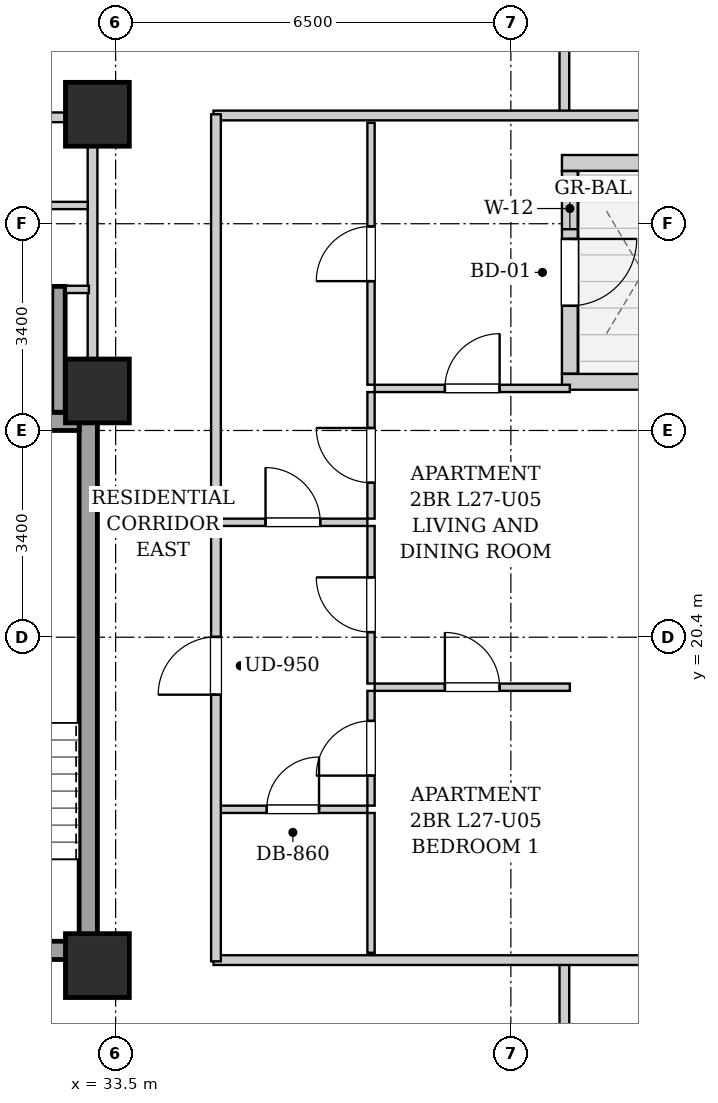
"""IFC4 building model, lengths in metres.
Left out: names, types, materials, properties, quantities, classifications, styles, units other than length and angle.
Written with IfcOpenShell. Run it as: python <this file> out.ifc"""

import sys

from ifc_helpers import new_model, si_unit, direction, frame, frame_2d, origin, origin_2d, place, context, subcontext, project, spatial, rectangle, extrude, element, fill, save


model = new_model("IFC4")
c1 = context("Model", 3, precision=1e-05, world=origin(), true_north=direction((0.0, 1.0)))
c2 = subcontext(c1, "Body", "Model", "MODEL_VIEW")
j1 = project(units=[si_unit("LENGTHUNIT", "METRE"), si_unit("PLANEANGLEUNIT", "RADIAN")], contexts=[c1])
p1 = place(None, origin())
s1 = spatial("IfcSite", under=j1, at=p1, CompositionType="ELEMENT")
p2 = place(p1, origin())
s2 = spatial("IfcBuilding", under=s1, at=p2, CompositionType="ELEMENT")
p3 = place(p2, frame((0.0, 0.0, 97.5)))
s3 = spatial("IfcBuildingStorey", under=s2, at=p3, CompositionType="ELEMENT", Elevation=97.5)
for number, where, z_axis, x_axis in (
    (1, (33.2, 15.0, 0.0), (0.0, 0.0, 1.0), (1.0, 0.0, 0.0)),
    (2, (33.2, 29.0, 0.0), (0.0, 0.0, 1.0), (1.0, 0.0, 0.0)),
    (3, (33.2, 24.45, 0.0), (0.0, 0.0, 1.0), (1.0, 0.0, 0.0)),
):
    element("IfcColumn", number, at=place(p3, frame(where, z_axis=z_axis, x_axis=x_axis)), inside=s3, PredefinedType="COLUMN", context=c2, shape_type="SweptSolid", body=[
        extrude(rectangle(XDim=1.05, YDim=1.05, at=origin_2d()), origin(), (0.0, 0.0, 1.0), 3.2),
    ])
p4 = place(p3, frame((43.24, 28.2, 0.0), z_axis=(0.0, 0.0, 1.0), x_axis=(-1.0, 0.0, 0.0)))
e4 = element("IfcWall", 4, at=p4, inside=s3, PredefinedType="SOLIDWALL", context=c2, shape_type="SweptSolid", body=[
    extrude(rectangle(XDim=2.4, YDim=0.26, at=frame_2d((1.2, 0.0))), origin(), (0.0, 0.0, 1.0), 2.94),
])
p5 = place(p3, frame((40.97, 28.066, 0.0), z_axis=(0.0, 0.0, 1.0), x_axis=(0.0, -1.0, 0.0)))
e5 = element("IfcWall", 5, at=p5, inside=s3, PredefinedType="SOLIDWALL", context=c2, shape_type="SweptSolid", body=[
    extrude(rectangle(XDim=3.332, YDim=0.26, at=frame_2d((1.666, 0.0))), origin(), (0.0, 0.0, 1.0), 2.94),
])
p6 = place(p5, frame((1.116, 0.0, 0.0)))
e6 = element("IfcOpeningElement", 6, at=p6, cuts=e5, PredefinedType="OPENING", context=c2, shape_type="SweptSolid", body=[
    extrude(rectangle(XDim=1.1, YDim=2.0, at=frame_2d((0.55, 1.0))), frame((0.0, 0.14, 0.0), z_axis=(0.0, -1.0, 0.0), x_axis=(1.0, 0.0, 0.0)), (0.0, 0.0, 1.0), 0.28),
])
p7 = place(p5, frame((0.276, 0.0, 0.55)))
e7 = element("IfcOpeningElement", 7, at=p7, cuts=e5, PredefinedType="OPENING", context=c2, shape_type="SweptSolid", body=[
    extrude(rectangle(XDim=0.68, YDim=1.2, at=frame_2d((0.34, 0.6))), frame((0.0, 0.14, 0.0), z_axis=(0.0, -1.0, 0.0), x_axis=(1.0, 0.0, 0.0)), (0.0, 0.0, 1.0), 0.28),
])
p8 = place(p3, frame((40.84, 24.6, 0.0), z_axis=(0.0, 0.0, 1.0), x_axis=(1.0, 0.0, 0.0)))
e8 = element("IfcWall", 8, at=p8, inside=s3, PredefinedType="SOLIDWALL", context=c2, shape_type="SweptSolid", body=[
    extrude(rectangle(XDim=2.4, YDim=0.26, at=frame_2d((1.2, 0.0))), origin(), (0.0, 0.0, 1.0), 2.94),
])
p9 = place(p3, frame((33.05, 15.1, 0.0), z_axis=(0.0, 0.0, 1.0), x_axis=(0.0, 1.0, 0.0)))
e9 = element("IfcWall", 9, at=p9, inside=s3, PredefinedType="SHEAR", context=c2, shape_type="SweptSolid", body=[
    extrude(rectangle(XDim=9.0, YDim=0.3, at=frame_2d((4.5, 0.0))), origin(), (0.0, 0.0, 1.0), 2.94),
])
p10 = place(p3, frame((30.05, 23.95, 0.0), z_axis=(0.0, 0.0, 1.0), x_axis=(1.0, 0.0, 0.0)))
e10 = element("IfcWall", 10, at=p10, inside=s3, PredefinedType="SHEAR", context=c2, shape_type="SweptSolid", body=[
    extrude(rectangle(XDim=2.85, YDim=0.3, at=frame_2d((1.425, 0.0))), origin(), (0.0, 0.0, 1.0), 2.94),
])
p11 = place(p3, frame((30.05, 15.25, 0.0), z_axis=(0.0, 0.0, 1.0), x_axis=(1.0, 0.0, 0.0)))
e11 = element("IfcWall", 11, at=p11, inside=s3, PredefinedType="SHEAR", context=c2, shape_type="SweptSolid", body=[
    extrude(rectangle(XDim=2.85, YDim=0.3, at=frame_2d((1.425, 0.0))), origin(), (0.0, 0.0, 1.0), 2.94),
])
p12 = place(p11, frame((0.86, 0.0, 0.0)))
e12 = element("IfcOpeningElement", 12, at=p12, cuts=e11, PredefinedType="OPENING", context=c2, shape_type="SweptSolid", body=[
    extrude(rectangle(XDim=1.1, YDim=2.05, at=frame_2d((0.55, 1.025))), frame((0.0, 0.16, 0.0), z_axis=(0.0, -1.0, 0.0), x_axis=(1.0, 0.0, 0.0)), (0.0, 0.0, 1.0), 0.32),
])
p13 = place(p3, frame((32.56, 24.1, 0.0), z_axis=(0.0, 0.0, 1.0), x_axis=(0.0, 1.0, 0.0)))
e13 = element("IfcWall", 13, at=p13, inside=s3, PredefinedType="SHEAR", context=c2, shape_type="SweptSolid", body=[
    extrude(rectangle(XDim=2.07, YDim=0.22, at=frame_2d((1.035, 0.0))), origin(), (0.0, 0.0, 1.0), 2.94),
])
p14 = place(p3, frame((33.12, 24.12, 0.0), z_axis=(0.0, 0.0, 1.0), x_axis=(0.0, 1.0, 0.0)))
e14 = element("IfcWall", 14, at=p14, inside=s3, PredefinedType="PARTITIONING", context=c2, shape_type="SweptSolid", body=[
    extrude(rectangle(XDim=4.76, YDim=0.16, at=frame_2d((2.38, 0.0))), origin(), (0.0, 0.0, 1.0), 2.275),
])
p15 = place(p3, frame((32.68, 26.12, 0.0), z_axis=(0.0, 0.0, 1.0), x_axis=(1.0, 0.0, 0.0)))
e15 = element("IfcWall", 15, at=p15, inside=s3, PredefinedType="PARTITIONING", context=c2, shape_type="SweptSolid", body=[
    extrude(rectangle(XDim=0.38, YDim=0.12, at=frame_2d((0.19, 0.0))), origin(), (0.0, 0.0, 1.0), 2.94),
])
p16 = place(p3, frame((30.16, 27.5, 0.0), z_axis=(0.0, 0.0, 1.0), x_axis=(1.0, 0.0, 0.0)))
e16 = element("IfcWall", 16, at=p16, inside=s3, PredefinedType="PARTITIONING", context=c2, shape_type="SweptSolid", body=[
    extrude(rectangle(XDim=2.88, YDim=0.12, at=frame_2d((1.44, 0.0))), origin(), (0.0, 0.0, 1.0), 2.94),
])
p17 = place(p16, frame((0.97, 0.0, 0.0)))
e17 = element("IfcOpeningElement", 17, at=p17, cuts=e16, PredefinedType="OPENING", context=c2, shape_type="SweptSolid", body=[
    extrude(rectangle(XDim=0.86, YDim=2.05, at=frame_2d((0.43, 1.025))), frame((0.0, 0.07, 0.0), z_axis=(0.0, -1.0, 0.0), x_axis=(1.0, 0.0, 0.0)), (0.0, 0.0, 1.0), 0.14),
])
p18 = place(p3, frame((30.08, 28.95, 0.0), z_axis=(0.0, 0.0, 1.0), x_axis=(1.0, 0.0, 0.0)))
e18 = element("IfcWall", 18, at=p18, inside=s3, PredefinedType="PARTITIONING", context=c2, shape_type="SweptSolid", body=[
    extrude(rectangle(XDim=2.96, YDim=0.16, at=frame_2d((1.48, 0.0))), origin(), (0.0, 0.0, 1.0), 2.94),
])
p19 = place(p18, frame((1.045, 0.0, 0.0)))
e19 = element("IfcOpeningElement", 19, at=p19, cuts=e18, PredefinedType="OPENING", context=c2, shape_type="SweptSolid", body=[
    extrude(rectangle(XDim=0.86, YDim=2.05, at=frame_2d((0.43, 1.025))), frame((0.0, 0.09, 0.0), z_axis=(0.0, -1.0, 0.0), x_axis=(1.0, 0.0, 0.0)), (0.0, 0.0, 1.0), 0.18),
])
for number, where, z_axis, x_axis in (
    (20, (40.88, 13.35, 0.0), (0.0, 0.0, 1.0), (0.0, 1.0, 0.0)),
    (21, (40.88, 28.98, 0.0), (0.0, 0.0, 1.0), (0.0, 1.0, 0.0)),
):
    element("IfcWall", number, at=place(p3, frame(where, z_axis=z_axis, x_axis=x_axis)), inside=s3, PredefinedType="PARTITIONING", context=c2, shape_type="SweptSolid", body=[
        extrude(rectangle(XDim=1.74, YDim=0.16, at=frame_2d((0.87, 0.0))), origin(), (0.0, 0.0, 1.0), 2.94),
    ])
for number, where, z_axis, x_axis in (
    (22, (35.11, 15.09, 0.0), (0.0, 0.0, 1.0), (1.0, 0.0, 0.0)),
    (23, (35.11, 28.98, 0.0), (0.0, 0.0, 1.0), (1.0, 0.0, 0.0)),
):
    element("IfcWall", number, at=place(p3, frame(where, z_axis=z_axis, x_axis=x_axis)), inside=s3, PredefinedType="PARTITIONING", context=c2, shape_type="SweptSolid", body=[
        extrude(rectangle(XDim=8.01, YDim=0.16, at=frame_2d((4.005, 0.0))), origin(), (0.0, 0.0, 1.0), 2.313),
    ])
p20 = place(p3, frame((35.19, 22.29, 0.0), z_axis=(0.0, 0.0, 1.0), x_axis=(1.0, 0.0, 0.0)))
e24 = element("IfcWall", 24, at=p20, inside=s3, PredefinedType="PARTITIONING", context=c2, shape_type="SweptSolid", body=[
    extrude(rectangle(XDim=2.45, YDim=0.12, at=frame_2d((1.225, 0.0))), origin(), (0.0, 0.0, 1.0), 2.94),
])
p21 = place(p20, frame((0.775, 0.0, 0.0)))
e25 = element("IfcOpeningElement", 25, at=p21, cuts=e24, PredefinedType="OPENING", context=c2, shape_type="SweptSolid", body=[
    extrude(rectangle(XDim=0.9, YDim=2.05, at=frame_2d((0.45, 1.025))), frame((0.0, 0.07, 0.0), z_axis=(0.0, -1.0, 0.0), x_axis=(1.0, 0.0, 0.0)), (0.0, 0.0, 1.0), 0.14),
])
p22 = place(p3, frame((37.7, 22.35, 0.0), z_axis=(0.0, 0.0, 1.0), x_axis=(0.0, 1.0, 0.0)))
e26 = element("IfcWall", 26, at=p22, inside=s3, PredefinedType="PARTITIONING", context=c2, shape_type="SweptSolid", body=[
    extrude(rectangle(XDim=2.082, YDim=0.12, at=frame_2d((1.041, 0.0))), origin(), (0.0, 0.0, 1.0), 2.94),
])
p23 = place(p22, frame((0.591, 0.0, 0.0)))
e27 = element("IfcOpeningElement", 27, at=p23, cuts=e26, PredefinedType="OPENING", context=c2, shape_type="SweptSolid", body=[
    extrude(rectangle(XDim=0.9, YDim=2.05, at=frame_2d((0.45, 1.025))), frame((0.0, 0.07, 0.0), z_axis=(0.0, -1.0, 0.0), x_axis=(1.0, 0.0, 0.0)), (0.0, 0.0, 1.0), 0.14),
])
p24 = place(p3, frame((37.7, 24.552, 0.0), z_axis=(0.0, 0.0, 1.0), x_axis=(0.0, 1.0, 0.0)))
e28 = element("IfcWall", 28, at=p24, inside=s3, PredefinedType="PARTITIONING", context=c2, shape_type="SweptSolid", body=[
    extrude(rectangle(XDim=4.308, YDim=0.12, at=frame_2d((2.154, 0.0))), origin(), (0.0, 0.0, 1.0), 2.94),
])
p25 = place(p24, frame((1.704, 0.0, 0.0)))
e29 = element("IfcOpeningElement", 29, at=p25, cuts=e28, PredefinedType="OPENING", context=c2, shape_type="SweptSolid", body=[
    extrude(rectangle(XDim=0.9, YDim=2.05, at=frame_2d((0.45, 1.025))), frame((0.0, 0.07, 0.0), z_axis=(0.0, -1.0, 0.0), x_axis=(1.0, 0.0, 0.0)), (0.0, 0.0, 1.0), 0.14),
])
p26 = place(p3, frame((35.19, 17.57, 0.0), z_axis=(0.0, 0.0, 1.0), x_axis=(1.0, 0.0, 0.0)))
e30 = element("IfcWall", 30, at=p26, inside=s3, PredefinedType="PARTITIONING", context=c2, shape_type="SweptSolid", body=[
    extrude(rectangle(XDim=2.45, YDim=0.12, at=frame_2d((1.225, 0.0))), origin(), (0.0, 0.0, 1.0), 2.94),
])
p27 = place(p26, frame((0.795, 0.0, 0.0)))
e31 = element("IfcOpeningElement", 31, at=p27, cuts=e30, PredefinedType="OPENING", context=c2, shape_type="SweptSolid", body=[
    extrude(rectangle(XDim=0.86, YDim=2.05, at=frame_2d((0.43, 1.025))), frame((0.0, 0.07, 0.0), z_axis=(0.0, -1.0, 0.0), x_axis=(1.0, 0.0, 0.0)), (0.0, 0.0, 1.0), 0.14),
])
p28 = place(p3, frame((37.7, 15.21, 0.0), z_axis=(0.0, 0.0, 1.0), x_axis=(0.0, 1.0, 0.0)))
e32 = element("IfcWall", 32, at=p28, inside=s3, PredefinedType="PARTITIONING", context=c2, shape_type="SweptSolid", body=[
    extrude(rectangle(XDim=2.3, YDim=0.12, at=frame_2d((1.15, 0.0))), origin(), (0.0, 0.0, 1.0), 2.94),
])
p29 = place(p3, frame((37.7, 17.63, 0.0), z_axis=(0.0, 0.0, 1.0), x_axis=(0.0, 1.0, 0.0)))
e33 = element("IfcWall", 33, at=p29, inside=s3, PredefinedType="PARTITIONING", context=c2, shape_type="SweptSolid", body=[
    extrude(rectangle(XDim=1.888, YDim=0.12, at=frame_2d((0.944, 0.0))), origin(), (0.0, 0.0, 1.0), 2.94),
])
p30 = place(p29, frame((0.494, 0.0, 0.0)))
e34 = element("IfcOpeningElement", 34, at=p30, cuts=e33, PredefinedType="OPENING", context=c2, shape_type="SweptSolid", body=[
    extrude(rectangle(XDim=0.9, YDim=2.05, at=frame_2d((0.45, 1.025))), frame((0.0, 0.07, 0.0), z_axis=(0.0, -1.0, 0.0), x_axis=(1.0, 0.0, 0.0)), (0.0, 0.0, 1.0), 0.14),
])
p31 = place(p3, frame((37.7, 19.638, 0.0), z_axis=(0.0, 0.0, 1.0), x_axis=(0.0, 1.0, 0.0)))
e35 = element("IfcWall", 35, at=p31, inside=s3, PredefinedType="PARTITIONING", context=c2, shape_type="SweptSolid", body=[
    extrude(rectangle(XDim=2.592, YDim=0.12, at=frame_2d((1.296, 0.0))), origin(), (0.0, 0.0, 1.0), 2.94),
])
p32 = place(p31, frame((0.846, 0.0, 0.0)))
e36 = element("IfcOpeningElement", 36, at=p32, cuts=e35, PredefinedType="OPENING", context=c2, shape_type="SweptSolid", body=[
    extrude(rectangle(XDim=0.9, YDim=2.05, at=frame_2d((0.45, 1.025))), frame((0.0, 0.07, 0.0), z_axis=(0.0, -1.0, 0.0), x_axis=(1.0, 0.0, 0.0)), (0.0, 0.0, 1.0), 0.14),
])
p33 = place(p3, frame((37.76, 19.578, 0.0), z_axis=(0.0, 0.0, 1.0), x_axis=(1.0, 0.0, 0.0)))
e37 = element("IfcWall", 37, at=p33, inside=s3, PredefinedType="PARTITIONING", context=c2, shape_type="SweptSolid", body=[
    extrude(rectangle(XDim=3.21, YDim=0.12, at=frame_2d((1.605, 0.0))), origin(), (0.0, 0.0, 1.0), 2.94),
])
p34 = place(p33, frame((1.155, 0.0, 0.0)))
e38 = element("IfcOpeningElement", 38, at=p34, cuts=e37, PredefinedType="OPENING", context=c2, shape_type="SweptSolid", body=[
    extrude(rectangle(XDim=0.9, YDim=2.05, at=frame_2d((0.45, 1.025))), frame((0.0, 0.07, 0.0), z_axis=(0.0, -1.0, 0.0), x_axis=(1.0, 0.0, 0.0)), (0.0, 0.0, 1.0), 0.14),
])
p35 = place(p3, frame((37.76, 24.492, 0.0), z_axis=(0.0, 0.0, 1.0), x_axis=(1.0, 0.0, 0.0)))
e39 = element("IfcWall", 39, at=p35, inside=s3, PredefinedType="PARTITIONING", context=c2, shape_type="SweptSolid", body=[
    extrude(rectangle(XDim=3.21, YDim=0.12, at=frame_2d((1.605, 0.0))), origin(), (0.0, 0.0, 1.0), 2.518),
])
p36 = place(p35, frame((1.155, 0.0, 0.0)))
e40 = element("IfcOpeningElement", 40, at=p36, cuts=e39, PredefinedType="OPENING", context=c2, shape_type="SweptSolid", body=[
    extrude(rectangle(XDim=0.9, YDim=2.05, at=frame_2d((0.45, 1.025))), frame((0.0, 0.07, 0.0), z_axis=(0.0, -1.0, 0.0), x_axis=(1.0, 0.0, 0.0)), (0.0, 0.0, 1.0), 0.14),
])
p37 = place(p3, frame((35.15, 15.07, 0.0), z_axis=(0.0, 0.0, 1.0), x_axis=(0.0, 1.0, 0.0)))
e41 = element("IfcWall", 41, at=p37, inside=s3, PredefinedType="PARTITIONING", context=c2, shape_type="SweptSolid", body=[
    extrude(rectangle(XDim=13.93, YDim=0.16, at=frame_2d((6.965, 0.0))), origin(), (0.0, 0.0, 1.0), 2.94),
])
p38 = place(p37, frame((4.385, 0.0, 0.0)))
e42 = element("IfcOpeningElement", 42, at=p38, cuts=e41, PredefinedType="OPENING", context=c2, shape_type="SweptSolid", body=[
    extrude(rectangle(XDim=0.95, YDim=2.1, at=frame_2d((0.475, 1.05))), frame((0.0, 0.09, 0.0), z_axis=(0.0, -1.0, 0.0), x_axis=(1.0, 0.0, 0.0)), (0.0, 0.0, 1.0), 0.18),
])
p39 = place(p21, origin())
e43 = element("IfcDoor", 43, at=p39, inside=s3, OperationType="SINGLE_SWING_LEFT", PredefinedType="DOOR", context=c2, shape_type="SweptSolid", body=[
    extrude(rectangle(XDim=0.9, YDim=2.05, at=frame_2d((0.45, 1.025))), frame((0.0, 0.025, 0.0), z_axis=(0.0, -1.0, 0.0), x_axis=(1.0, 0.0, 0.0)), (0.0, 0.0, 1.0), 0.05),
])
fill(e25, e43)
p40 = place(p23, origin())
e44 = element("IfcDoor", 44, at=p40, inside=s3, OperationType="SINGLE_SWING_RIGHT", PredefinedType="DOOR", context=c2, shape_type="SweptSolid", body=[
    extrude(rectangle(XDim=0.9, YDim=2.05, at=frame_2d((0.45, 1.025))), frame((0.0, 0.025, 0.0), z_axis=(0.0, -1.0, 0.0), x_axis=(1.0, 0.0, 0.0)), (0.0, 0.0, 1.0), 0.05),
])
fill(e27, e44)
p41 = place(p25, origin())
e45 = element("IfcDoor", 45, at=p41, inside=s3, OperationType="SINGLE_SWING_LEFT", PredefinedType="DOOR", context=c2, shape_type="SweptSolid", body=[
    extrude(rectangle(XDim=0.9, YDim=2.05, at=frame_2d((0.45, 1.025))), frame((0.0, 0.025, 0.0), z_axis=(0.0, -1.0, 0.0), x_axis=(1.0, 0.0, 0.0)), (0.0, 0.0, 1.0), 0.05),
])
fill(e29, e45)
p42 = place(p27, origin())
e46 = element("IfcDoor", 46, at=p42, inside=s3, OperationType="SINGLE_SWING_RIGHT", PredefinedType="DOOR", context=c2, shape_type="SweptSolid", body=[
    extrude(rectangle(XDim=0.86, YDim=2.05, at=frame_2d((0.43, 1.025))), frame((0.0, 0.025, 0.0), z_axis=(0.0, -1.0, 0.0), x_axis=(1.0, 0.0, 0.0)), (0.0, 0.0, 1.0), 0.05),
])
fill(e31, e46)
p43 = place(p30, origin())
e47 = element("IfcDoor", 47, at=p43, inside=s3, OperationType="SINGLE_SWING_LEFT", PredefinedType="DOOR", context=c2, shape_type="SweptSolid", body=[
    extrude(rectangle(XDim=0.9, YDim=2.05, at=frame_2d((0.45, 1.025))), frame((0.0, 0.025, 0.0), z_axis=(0.0, -1.0, 0.0), x_axis=(1.0, 0.0, 0.0)), (0.0, 0.0, 1.0), 0.05),
])
fill(e34, e47)
p44 = place(p32, origin())
e48 = element("IfcDoor", 48, at=p44, inside=s3, OperationType="SINGLE_SWING_RIGHT", PredefinedType="DOOR", context=c2, shape_type="SweptSolid", body=[
    extrude(rectangle(XDim=0.9, YDim=2.05, at=frame_2d((0.45, 1.025))), frame((0.0, 0.025, 0.0), z_axis=(0.0, -1.0, 0.0), x_axis=(1.0, 0.0, 0.0)), (0.0, 0.0, 1.0), 0.05),
])
fill(e36, e48)
p45 = place(p34, origin())
e49 = element("IfcDoor", 49, at=p45, inside=s3, OperationType="SINGLE_SWING_LEFT", PredefinedType="DOOR", context=c2, shape_type="SweptSolid", body=[
    extrude(rectangle(XDim=0.9, YDim=2.05, at=frame_2d((0.45, 1.025))), frame((0.0, 0.025, 0.0), z_axis=(0.0, -1.0, 0.0), x_axis=(1.0, 0.0, 0.0)), (0.0, 0.0, 1.0), 0.05),
])
fill(e38, e49)
p46 = place(p36, origin())
e50 = element("IfcDoor", 50, at=p46, inside=s3, OperationType="SINGLE_SWING_RIGHT", PredefinedType="DOOR", context=c2, shape_type="SweptSolid", body=[
    extrude(rectangle(XDim=0.9, YDim=2.05, at=frame_2d((0.45, 1.025))), frame((0.0, 0.025, 0.0), z_axis=(0.0, -1.0, 0.0), x_axis=(1.0, 0.0, 0.0)), (0.0, 0.0, 1.0), 0.05),
])
fill(e40, e50)
p47 = place(p38, origin())
e51 = element("IfcDoor", 51, at=p47, inside=s3, OperationType="SINGLE_SWING_LEFT", PredefinedType="DOOR", context=c2, shape_type="SweptSolid", body=[
    extrude(rectangle(XDim=0.95, YDim=2.1, at=frame_2d((0.475, 1.05))), frame((0.0, 0.025, 0.0), z_axis=(0.0, -1.0, 0.0), x_axis=(1.0, 0.0, 0.0)), (0.0, 0.0, 1.0), 0.05),
])
fill(e42, e51)
p48 = place(p6, origin())
e52 = element("IfcDoor", 52, at=p48, inside=s3, OperationType="SINGLE_SWING_LEFT", PredefinedType="DOOR", context=c2, shape_type="SweptSolid", body=[
    extrude(rectangle(XDim=1.1, YDim=2.0, at=frame_2d((0.55, 1.0))), frame((0.0, 0.025, 0.0), z_axis=(0.0, -1.0, 0.0), x_axis=(1.0, 0.0, 0.0)), (0.0, 0.0, 1.0), 0.05),
])
fill(e6, e52)
p49 = place(p7, origin())
e53 = element("IfcWindow", 53, at=p49, inside=s3, PartitioningType="SINGLE_PANEL", PredefinedType="WINDOW", context=c2, shape_type="SweptSolid", body=[
    extrude(rectangle(XDim=0.68, YDim=1.2, at=frame_2d((0.34, 0.6))), frame((0.0, 0.03, 0.0), z_axis=(0.0, -1.0, 0.0), x_axis=(1.0, 0.0, 0.0)), (0.0, 0.0, 1.0), 0.06),
])
fill(e7, e53)
save(model, sys.argv[1])
